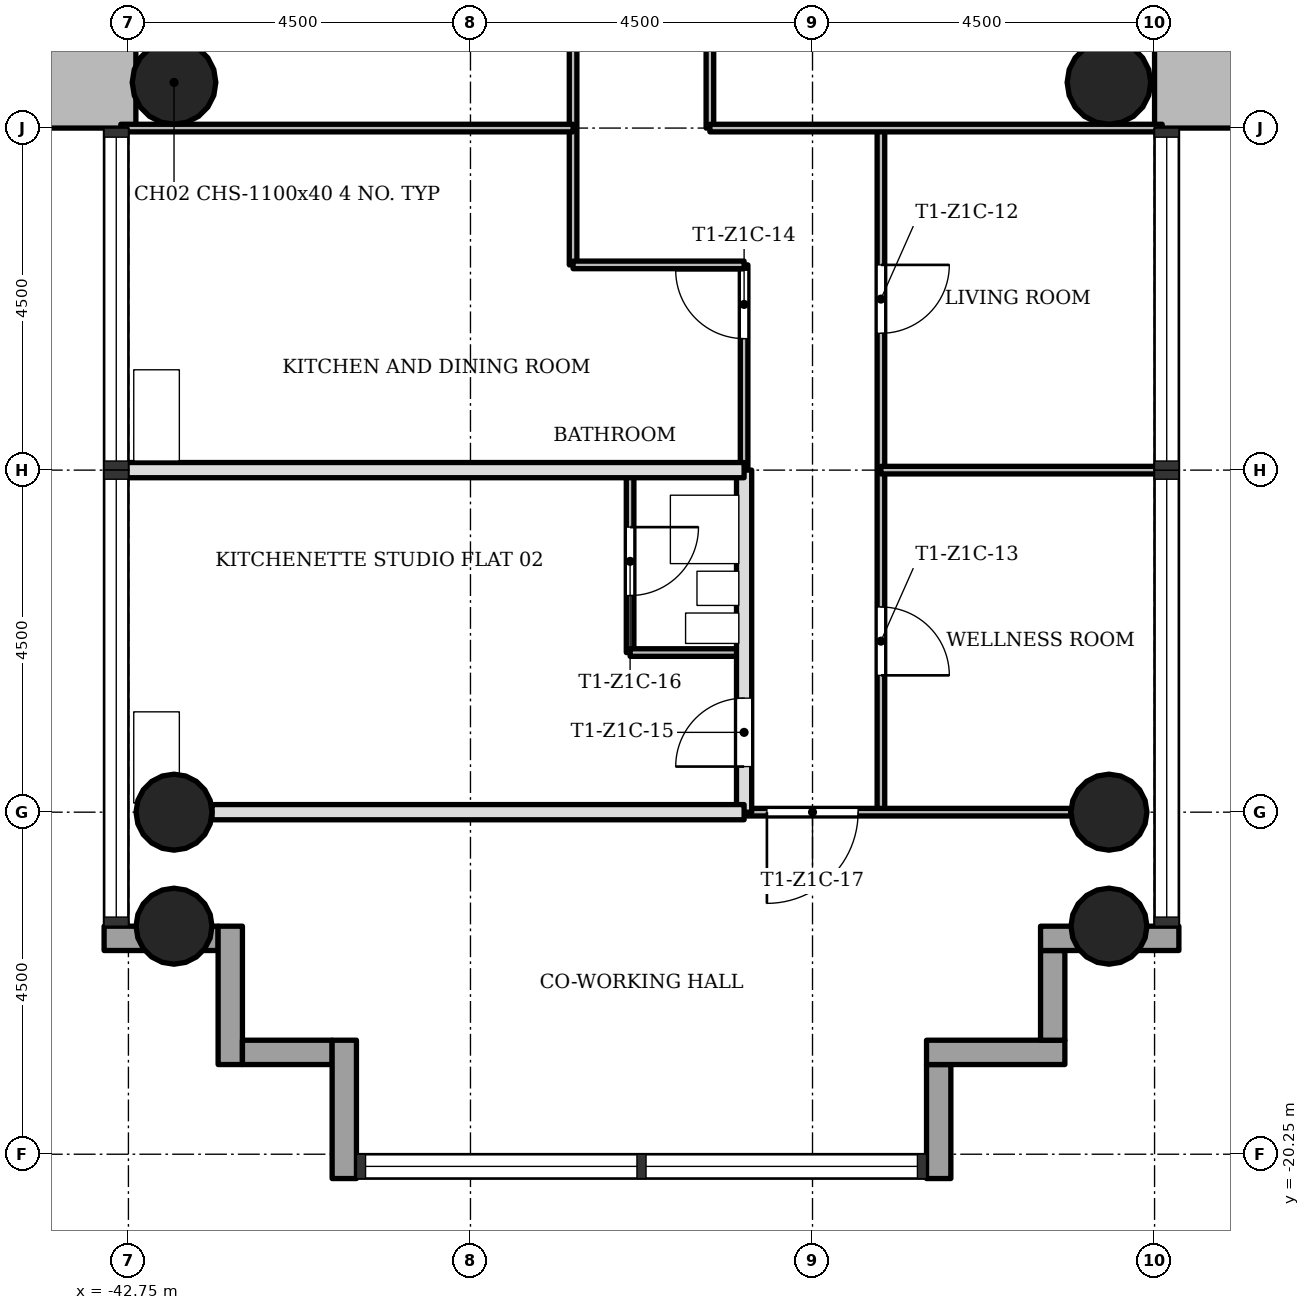
"""IFC4 building model, lengths in metres.
Left out: names, types, materials, properties, quantities, classifications, styles, units other than length and angle.
Written with IfcOpenShell. Run it as: python <this file> out.ifc"""

import sys

from ifc_helpers import new_model, si_unit, direction, frame, frame_2d, origin, origin_2d, place, context, subcontext, project, spatial, rectangle, hollow_circle, extrude, element, fill, save


model = new_model("IFC4")
c1 = context("Model", 3, precision=1e-05, world=origin(), true_north=direction((0.0, 1.0)))
c2 = subcontext(c1, "Body", "Model", "MODEL_VIEW")
j1 = project(units=[si_unit("LENGTHUNIT", "METRE"), si_unit("PLANEANGLEUNIT", "RADIAN")], contexts=[c1])
p1 = place(None, origin())
s1 = spatial("IfcSite", under=j1, at=p1, CompositionType="ELEMENT")
p2 = place(p1, origin())
s2 = spatial("IfcBuilding", under=s1, at=p2, CompositionType="ELEMENT")
p3 = place(p2, frame((0.0, 0.0, 48.3)))
s3 = spatial("IfcBuildingStorey", under=s2, at=p3, CompositionType="ELEMENT", Elevation=48.3)
p4 = place(p3, frame((-28.7, 5.65, 0.0), z_axis=(0.0, 0.0, 1.0), x_axis=(0.0, -1.0, 0.0)))
e1 = element("IfcWall", 1, at=p4, inside=s3, PredefinedType="SHEAR", context=c2, shape_type="SweptSolid", body=[
    extrude(rectangle(XDim=12.4, YDim=1.1, at=frame_2d((6.2, 0.0))), origin(), (0.0, 0.0, 1.0), 3.4),
])
p5 = place(p4, frame((4.75, 0.0, 0.0)))
e2 = element("IfcOpeningElement", 2, at=p5, cuts=e1, PredefinedType="OPENING", context=c2, shape_type="SweptSolid", body=[
    extrude(rectangle(XDim=1.8, YDim=2.1, at=frame_2d((0.9, 1.05))), frame((0.0, 0.56, 0.0), z_axis=(0.0, -1.0, 0.0), x_axis=(1.0, 0.0, 0.0)), (0.0, 0.0, 1.0), 1.12),
])
p6 = place(p3, frame((-50.65, -6.2, 0.0), z_axis=(0.0, 0.0, 1.0), x_axis=(1.0, 0.0, 0.0)))
e3 = element("IfcWall", 3, at=p6, inside=s3, PredefinedType="SHEAR", context=c2, shape_type="SweptSolid", body=[
    extrude(rectangle(XDim=7.998, YDim=1.1, at=frame_2d((3.999, 0.0))), origin(), (0.0, 0.0, 1.0), 3.4),
])
for number, where, z_axis, x_axis in (
    (4, (-42.15, -15.75, 0.0), (0.0, 0.0, 1.0), (1.0, 0.0, 0.0)),
    (5, (-29.85, -15.75, 0.0), (0.0, 0.0, 1.0), (1.0, 0.0, 0.0)),
    (6, (-42.15, -17.25, 0.0), (0.0, 0.0, 1.0), (1.0, 0.0, 0.0)),
    (7, (-29.85, -17.25, 0.0), (0.0, 0.0, 1.0), (1.0, 0.0, 0.0)),
):
    element("IfcColumn", number, at=place(p3, frame(where, z_axis=z_axis, x_axis=x_axis)), inside=s3, PredefinedType="COLUMN", context=c2, shape_type="SweptSolid", body=[
        extrude(hollow_circle(Radius=0.5, WallThickness=0.036, at=origin_2d()), origin(), (0.0, 0.0, 1.0), 3.4),
    ])
for number, where, z_axis, x_axis in (
    (8, (-42.15, -6.15, 0.0), (0.0, 0.0, 1.0), (1.0, 0.0, 0.0)),
    (9, (-29.85, -6.15, 0.0), (0.0, 0.0, 1.0), (1.0, 0.0, 0.0)),
):
    element("IfcColumn", number, at=place(p3, frame(where, z_axis=z_axis, x_axis=x_axis)), inside=s3, PredefinedType="COLUMN", context=c2, shape_type="SweptSolid", body=[
        extrude(hollow_circle(Radius=0.55, WallThickness=0.04, at=origin_2d()), origin(), (0.0, 0.0, 1.0), 3.4),
    ])
p7 = place(p3, frame((-43.07, -17.41, -0.3), z_axis=(0.0, 0.0, 1.0), x_axis=(1.0, 0.0, 0.0)))
e10 = element("IfcWall", 10, at=p7, inside=s3, PredefinedType="STANDARD", context=c2, shape_type="SweptSolid", body=[
    extrude(rectangle(XDim=1.5, YDim=0.32, at=frame_2d((0.75, 0.0))), origin(), (0.0, 0.0, 1.0), 3.4),
])
p8 = place(p3, frame((-41.41, -17.25, -0.3), z_axis=(0.0, 0.0, 1.0), x_axis=(0.0, -1.0, 0.0)))
e11 = element("IfcWall", 11, at=p8, inside=s3, PredefinedType="STANDARD", context=c2, shape_type="SweptSolid", body=[
    extrude(rectangle(XDim=1.82, YDim=0.32, at=frame_2d((0.91, 0.0))), origin(), (0.0, 0.0, 1.0), 3.4),
])
p9 = place(p3, frame((-41.25, -18.91, -0.3), z_axis=(0.0, 0.0, 1.0), x_axis=(1.0, 0.0, 0.0)))
e12 = element("IfcWall", 12, at=p9, inside=s3, PredefinedType="STANDARD", context=c2, shape_type="SweptSolid", body=[
    extrude(rectangle(XDim=1.18, YDim=0.32, at=frame_2d((0.59, 0.0))), origin(), (0.0, 0.0, 1.0), 3.4),
])
p10 = place(p3, frame((-39.91, -18.75, -0.3), z_axis=(0.0, 0.0, 1.0), x_axis=(0.0, -1.0, 0.0)))
e13 = element("IfcWall", 13, at=p10, inside=s3, PredefinedType="STANDARD", context=c2, shape_type="SweptSolid", body=[
    extrude(rectangle(XDim=1.82, YDim=0.32, at=frame_2d((0.91, 0.0))), origin(), (0.0, 0.0, 1.0), 3.4),
])
p11 = place(p3, frame((-32.09, -20.57, -0.3), z_axis=(0.0, 0.0, 1.0), x_axis=(0.0, 1.0, 0.0)))
e14 = element("IfcWall", 14, at=p11, inside=s3, PredefinedType="STANDARD", context=c2, shape_type="SweptSolid", body=[
    extrude(rectangle(XDim=1.5, YDim=0.32, at=frame_2d((0.75, 0.0))), origin(), (0.0, 0.0, 1.0), 3.4),
])
p12 = place(p3, frame((-32.25, -18.91, -0.3), z_axis=(0.0, 0.0, 1.0), x_axis=(1.0, 0.0, 0.0)))
e15 = element("IfcWall", 15, at=p12, inside=s3, PredefinedType="STANDARD", context=c2, shape_type="SweptSolid", body=[
    extrude(rectangle(XDim=1.82, YDim=0.32, at=frame_2d((0.91, 0.0))), origin(), (0.0, 0.0, 1.0), 3.4),
])
p13 = place(p3, frame((-30.59, -18.75, -0.3), z_axis=(0.0, 0.0, 1.0), x_axis=(0.0, 1.0, 0.0)))
e16 = element("IfcWall", 16, at=p13, inside=s3, PredefinedType="STANDARD", context=c2, shape_type="SweptSolid", body=[
    extrude(rectangle(XDim=1.18, YDim=0.32, at=frame_2d((0.59, 0.0))), origin(), (0.0, 0.0, 1.0), 3.4),
])
p14 = place(p3, frame((-30.75, -17.41, -0.3), z_axis=(0.0, 0.0, 1.0), x_axis=(1.0, 0.0, 0.0)))
e17 = element("IfcWall", 17, at=p14, inside=s3, PredefinedType="STANDARD", context=c2, shape_type="SweptSolid", body=[
    extrude(rectangle(XDim=1.82, YDim=0.32, at=frame_2d((0.91, 0.0))), origin(), (0.0, 0.0, 1.0), 3.4),
])
p15 = place(p3, frame((-36.9, -8.55, 0.0), z_axis=(0.0, 0.0, 1.0), x_axis=(0.0, 1.0, 0.0)))
e18 = element("IfcWall", 18, at=p15, inside=s3, PredefinedType="PARTITIONING", context=c2, shape_type="SweptSolid", body=[
    extrude(rectangle(XDim=7.05, YDim=0.1, at=frame_2d((3.525, 0.0))), origin(), (0.0, 0.0, 1.0), 3.0),
])
p16 = place(p3, frame((-36.15, -13.65, 0.0), z_axis=(0.0, 0.0, 1.0), x_axis=(0.0, 1.0, 0.0)))
e19 = element("IfcWall", 19, at=p16, inside=s3, PredefinedType="PARTITIONING", context=c2, shape_type="SweptSolid", body=[
    extrude(rectangle(XDim=2.4, YDim=0.1, at=frame_2d((1.2, 0.0))), origin(), (0.0, 0.0, 1.0), 3.0),
])
p17 = place(p16, frame((0.75, 0.0, 0.0)))
e20 = element("IfcOpeningElement", 20, at=p17, cuts=e19, PredefinedType="OPENING", context=c2, shape_type="SweptSolid", body=[
    extrude(rectangle(XDim=0.9, YDim=2.1, at=frame_2d((0.45, 1.05))), frame((0.0, 0.06, 0.0), z_axis=(0.0, -1.0, 0.0), x_axis=(1.0, 0.0, 0.0)), (0.0, 0.0, 1.0), 0.12),
])
p18 = place(p3, frame((-35.1, -6.75, 0.0), z_axis=(0.0, 0.0, 1.0), x_axis=(0.0, 1.0, 0.0)))
e21 = element("IfcWall", 21, at=p18, inside=s3, PredefinedType="PARTITIONING", context=c2, shape_type="SweptSolid", body=[
    extrude(rectangle(XDim=5.25, YDim=0.1, at=frame_2d((2.625, 0.0))), origin(), (0.0, 0.0, 1.0), 3.0),
])
p19 = place(p3, frame((-34.65, -11.25, 0.0), z_axis=(0.0, 0.0, 1.0), x_axis=(0.0, 1.0, 0.0)))
e22 = element("IfcWall", 22, at=p19, inside=s3, PredefinedType="PARTITIONING", context=c2, shape_type="SweptSolid", body=[
    extrude(rectangle(XDim=2.7, YDim=0.1, at=frame_2d((1.35, 0.0))), origin(), (0.0, 0.0, 1.0), 3.0),
])
p20 = place(p19, frame((1.73, 0.0, 0.0)))
e23 = element("IfcOpeningElement", 23, at=p20, cuts=e22, PredefinedType="OPENING", context=c2, shape_type="SweptSolid", body=[
    extrude(rectangle(XDim=0.9, YDim=2.1, at=frame_2d((0.45, 1.05))), frame((0.0, 0.06, 0.0), z_axis=(0.0, -1.0, 0.0), x_axis=(1.0, 0.0, 0.0)), (0.0, 0.0, 1.0), 0.12),
])
p21 = place(p3, frame((-34.65, -15.75, 0.0), z_axis=(0.0, 0.0, 1.0), x_axis=(0.0, 1.0, 0.0)))
e24 = element("IfcWall", 24, at=p21, inside=s3, PredefinedType="SOLIDWALL", context=c2, shape_type="SweptSolid", body=[
    extrude(rectangle(XDim=4.5, YDim=0.2, at=frame_2d((2.25, 0.0))), origin(), (0.0, 0.0, 1.0), 3.0),
])
p22 = place(p21, frame((0.6, 0.0, 0.0)))
e25 = element("IfcOpeningElement", 25, at=p22, cuts=e24, PredefinedType="OPENING", context=c2, shape_type="SweptSolid", body=[
    extrude(rectangle(XDim=0.9, YDim=2.1, at=frame_2d((0.45, 1.05))), frame((0.0, 0.11, 0.0), z_axis=(0.0, -1.0, 0.0), x_axis=(1.0, 0.0, 0.0)), (0.0, 0.0, 1.0), 0.22),
])
p23 = place(p3, frame((-32.85, -15.75, 0.0), z_axis=(0.0, 0.0, 1.0), x_axis=(0.0, 1.0, 0.0)))
e26 = element("IfcWall", 26, at=p23, inside=s3, PredefinedType="PARTITIONING", context=c2, shape_type="SweptSolid", body=[
    extrude(rectangle(XDim=9.0, YDim=0.1, at=frame_2d((4.5, 0.0))), origin(), (0.0, 0.0, 1.0), 3.0),
])
p24 = place(p23, frame((6.3, 0.0, 0.0)))
e27 = element("IfcOpeningElement", 27, at=p24, cuts=e26, PredefinedType="OPENING", context=c2, shape_type="SweptSolid", body=[
    extrude(rectangle(XDim=0.9, YDim=2.1, at=frame_2d((0.45, 1.05))), frame((0.0, 0.06, 0.0), z_axis=(0.0, -1.0, 0.0), x_axis=(1.0, 0.0, 0.0)), (0.0, 0.0, 1.0), 0.12),
])
p25 = place(p23, frame((1.8, 0.0, 0.0)))
e28 = element("IfcOpeningElement", 28, at=p25, cuts=e26, PredefinedType="OPENING", context=c2, shape_type="SweptSolid", body=[
    extrude(rectangle(XDim=0.9, YDim=2.1, at=frame_2d((0.45, 1.05))), frame((0.0, 0.06, 0.0), z_axis=(0.0, -1.0, 0.0), x_axis=(1.0, 0.0, 0.0)), (0.0, 0.0, 1.0), 0.12),
])
p26 = place(p3, frame((-34.65, -15.75, 0.0), z_axis=(0.0, 0.0, 1.0), x_axis=(1.0, 0.0, 0.0)))
e29 = element("IfcWall", 29, at=p26, inside=s3, PredefinedType="PARTITIONING", context=c2, shape_type="SweptSolid", body=[
    extrude(rectangle(XDim=4.3, YDim=0.1, at=frame_2d((2.15, 0.0))), origin(), (0.0, 0.0, 1.0), 3.0),
])
p27 = place(p26, frame((0.3, 0.0, 0.0)))
e30 = element("IfcOpeningElement", 30, at=p27, cuts=e29, PredefinedType="OPENING", context=c2, shape_type="SweptSolid", body=[
    extrude(rectangle(XDim=1.2, YDim=2.1, at=frame_2d((0.6, 1.05))), frame((0.0, 0.06, 0.0), z_axis=(0.0, -1.0, 0.0), x_axis=(1.0, 0.0, 0.0)), (0.0, 0.0, 1.0), 0.12),
])
p28 = place(p3, frame((-41.65, -15.75, 0.0), z_axis=(0.0, 0.0, 1.0), x_axis=(1.0, 0.0, 0.0)))
e31 = element("IfcWall", 31, at=p28, inside=s3, PredefinedType="SOLIDWALL", context=c2, shape_type="SweptSolid", body=[
    extrude(rectangle(XDim=7.0, YDim=0.2, at=frame_2d((3.5, 0.0))), origin(), (0.0, 0.0, 1.0), 3.0),
])
p29 = place(p3, frame((-36.15, -13.65, 0.0), z_axis=(0.0, 0.0, 1.0), x_axis=(1.0, 0.0, 0.0)))
e32 = element("IfcWall", 32, at=p29, inside=s3, PredefinedType="PARTITIONING", context=c2, shape_type="SweptSolid", body=[
    extrude(rectangle(XDim=1.5, YDim=0.1, at=frame_2d((0.75, 0.0))), origin(), (0.0, 0.0, 1.0), 3.0),
])
p30 = place(p3, frame((-32.85, -11.25, 0.0), z_axis=(0.0, 0.0, 1.0), x_axis=(1.0, 0.0, 0.0)))
e33 = element("IfcWall", 33, at=p30, inside=s3, PredefinedType="PARTITIONING", context=c2, shape_type="SweptSolid", body=[
    extrude(rectangle(XDim=3.7, YDim=0.1, at=frame_2d((1.85, 0.0))), origin(), (0.0, 0.0, 1.0), 3.0),
])
p31 = place(p3, frame((-42.85, -11.25, 0.0), z_axis=(0.0, 0.0, 1.0), x_axis=(1.0, 0.0, 0.0)))
e34 = element("IfcWall", 34, at=p31, inside=s3, PredefinedType="SOLIDWALL", context=c2, shape_type="SweptSolid", body=[
    extrude(rectangle(XDim=8.2, YDim=0.2, at=frame_2d((4.1, 0.0))), origin(), (0.0, 0.0, 1.0), 3.0),
])
p32 = place(p3, frame((-36.9, -8.55, 0.0), z_axis=(0.0, 0.0, 1.0), x_axis=(1.0, 0.0, 0.0)))
e35 = element("IfcWall", 35, at=p32, inside=s3, PredefinedType="PARTITIONING", context=c2, shape_type="SweptSolid", body=[
    extrude(rectangle(XDim=2.25, YDim=0.1, at=frame_2d((1.125, 0.0))), origin(), (0.0, 0.0, 1.0), 3.0),
])
for number, where, z_axis, x_axis in (
    (36, (-42.85, -6.75, 0.0), (0.0, 0.0, 1.0), (1.0, 0.0, 0.0)),
    (37, (-35.1, -6.75, 0.0), (0.0, 0.0, 1.0), (1.0, 0.0, 0.0)),
):
    element("IfcWall", number, at=place(p3, frame(where, z_axis=z_axis, x_axis=x_axis)), inside=s3, PredefinedType="PARTITIONING", context=c2, shape_type="SweptSolid", body=[
        extrude(rectangle(XDim=5.95, YDim=0.1, at=frame_2d((2.975, 0.0))), origin(), (0.0, 0.0, 1.0), 3.0),
    ])
p33 = place(p24, origin())
e38 = element("IfcDoor", 38, at=p33, inside=s3, OperationType="SINGLE_SWING_RIGHT", PredefinedType="DOOR", context=c2, shape_type="SweptSolid", body=[
    extrude(rectangle(XDim=0.9, YDim=2.1, at=frame_2d((0.45, 1.05))), frame((0.0, 0.025, 0.0), z_axis=(0.0, -1.0, 0.0), x_axis=(1.0, 0.0, 0.0)), (0.0, 0.0, 1.0), 0.05),
])
fill(e27, e38)
p34 = place(p25, origin())
e39 = element("IfcDoor", 39, at=p34, inside=s3, OperationType="SINGLE_SWING_LEFT", PredefinedType="DOOR", context=c2, shape_type="SweptSolid", body=[
    extrude(rectangle(XDim=0.9, YDim=2.1, at=frame_2d((0.45, 1.05))), frame((0.0, 0.025, 0.0), z_axis=(0.0, -1.0, 0.0), x_axis=(1.0, 0.0, 0.0)), (0.0, 0.0, 1.0), 0.05),
])
fill(e28, e39)
p35 = place(p20, origin())
e40 = element("IfcDoor", 40, at=p35, inside=s3, OperationType="SINGLE_SWING_LEFT", PredefinedType="DOOR", context=c2, shape_type="SweptSolid", body=[
    extrude(rectangle(XDim=0.9, YDim=2.1, at=frame_2d((0.45, 1.05))), frame((0.0, 0.025, 0.0), z_axis=(0.0, -1.0, 0.0), x_axis=(1.0, 0.0, 0.0)), (0.0, 0.0, 1.0), 0.05),
])
fill(e23, e40)
p36 = place(p22, origin())
e41 = element("IfcDoor", 41, at=p36, inside=s3, OperationType="SINGLE_SWING_RIGHT", PredefinedType="DOOR", context=c2, shape_type="SweptSolid", body=[
    extrude(rectangle(XDim=0.9, YDim=2.1, at=frame_2d((0.45, 1.05))), frame((0.0, 0.025, 0.0), z_axis=(0.0, -1.0, 0.0), x_axis=(1.0, 0.0, 0.0)), (0.0, 0.0, 1.0), 0.05),
])
fill(e25, e41)
p37 = place(p17, origin())
e42 = element("IfcDoor", 42, at=p37, inside=s3, OperationType="SINGLE_SWING_RIGHT", PredefinedType="DOOR", context=c2, shape_type="SweptSolid", body=[
    extrude(rectangle(XDim=0.9, YDim=2.1, at=frame_2d((0.45, 1.05))), frame((0.0, 0.025, 0.0), z_axis=(0.0, -1.0, 0.0), x_axis=(1.0, 0.0, 0.0)), (0.0, 0.0, 1.0), 0.05),
])
fill(e20, e42)
p38 = place(p27, origin())
e43 = element("IfcDoor", 43, at=p38, inside=s3, OperationType="SINGLE_SWING_LEFT", PredefinedType="DOOR", context=c2, shape_type="SweptSolid", body=[
    extrude(rectangle(XDim=1.2, YDim=2.1, at=frame_2d((0.6, 1.05))), frame((0.0, 0.025, 0.0), z_axis=(0.0, -1.0, 0.0), x_axis=(1.0, 0.0, 0.0)), (0.0, 0.0, 1.0), 0.05),
])
fill(e30, e43)
save(model, sys.argv[1])
